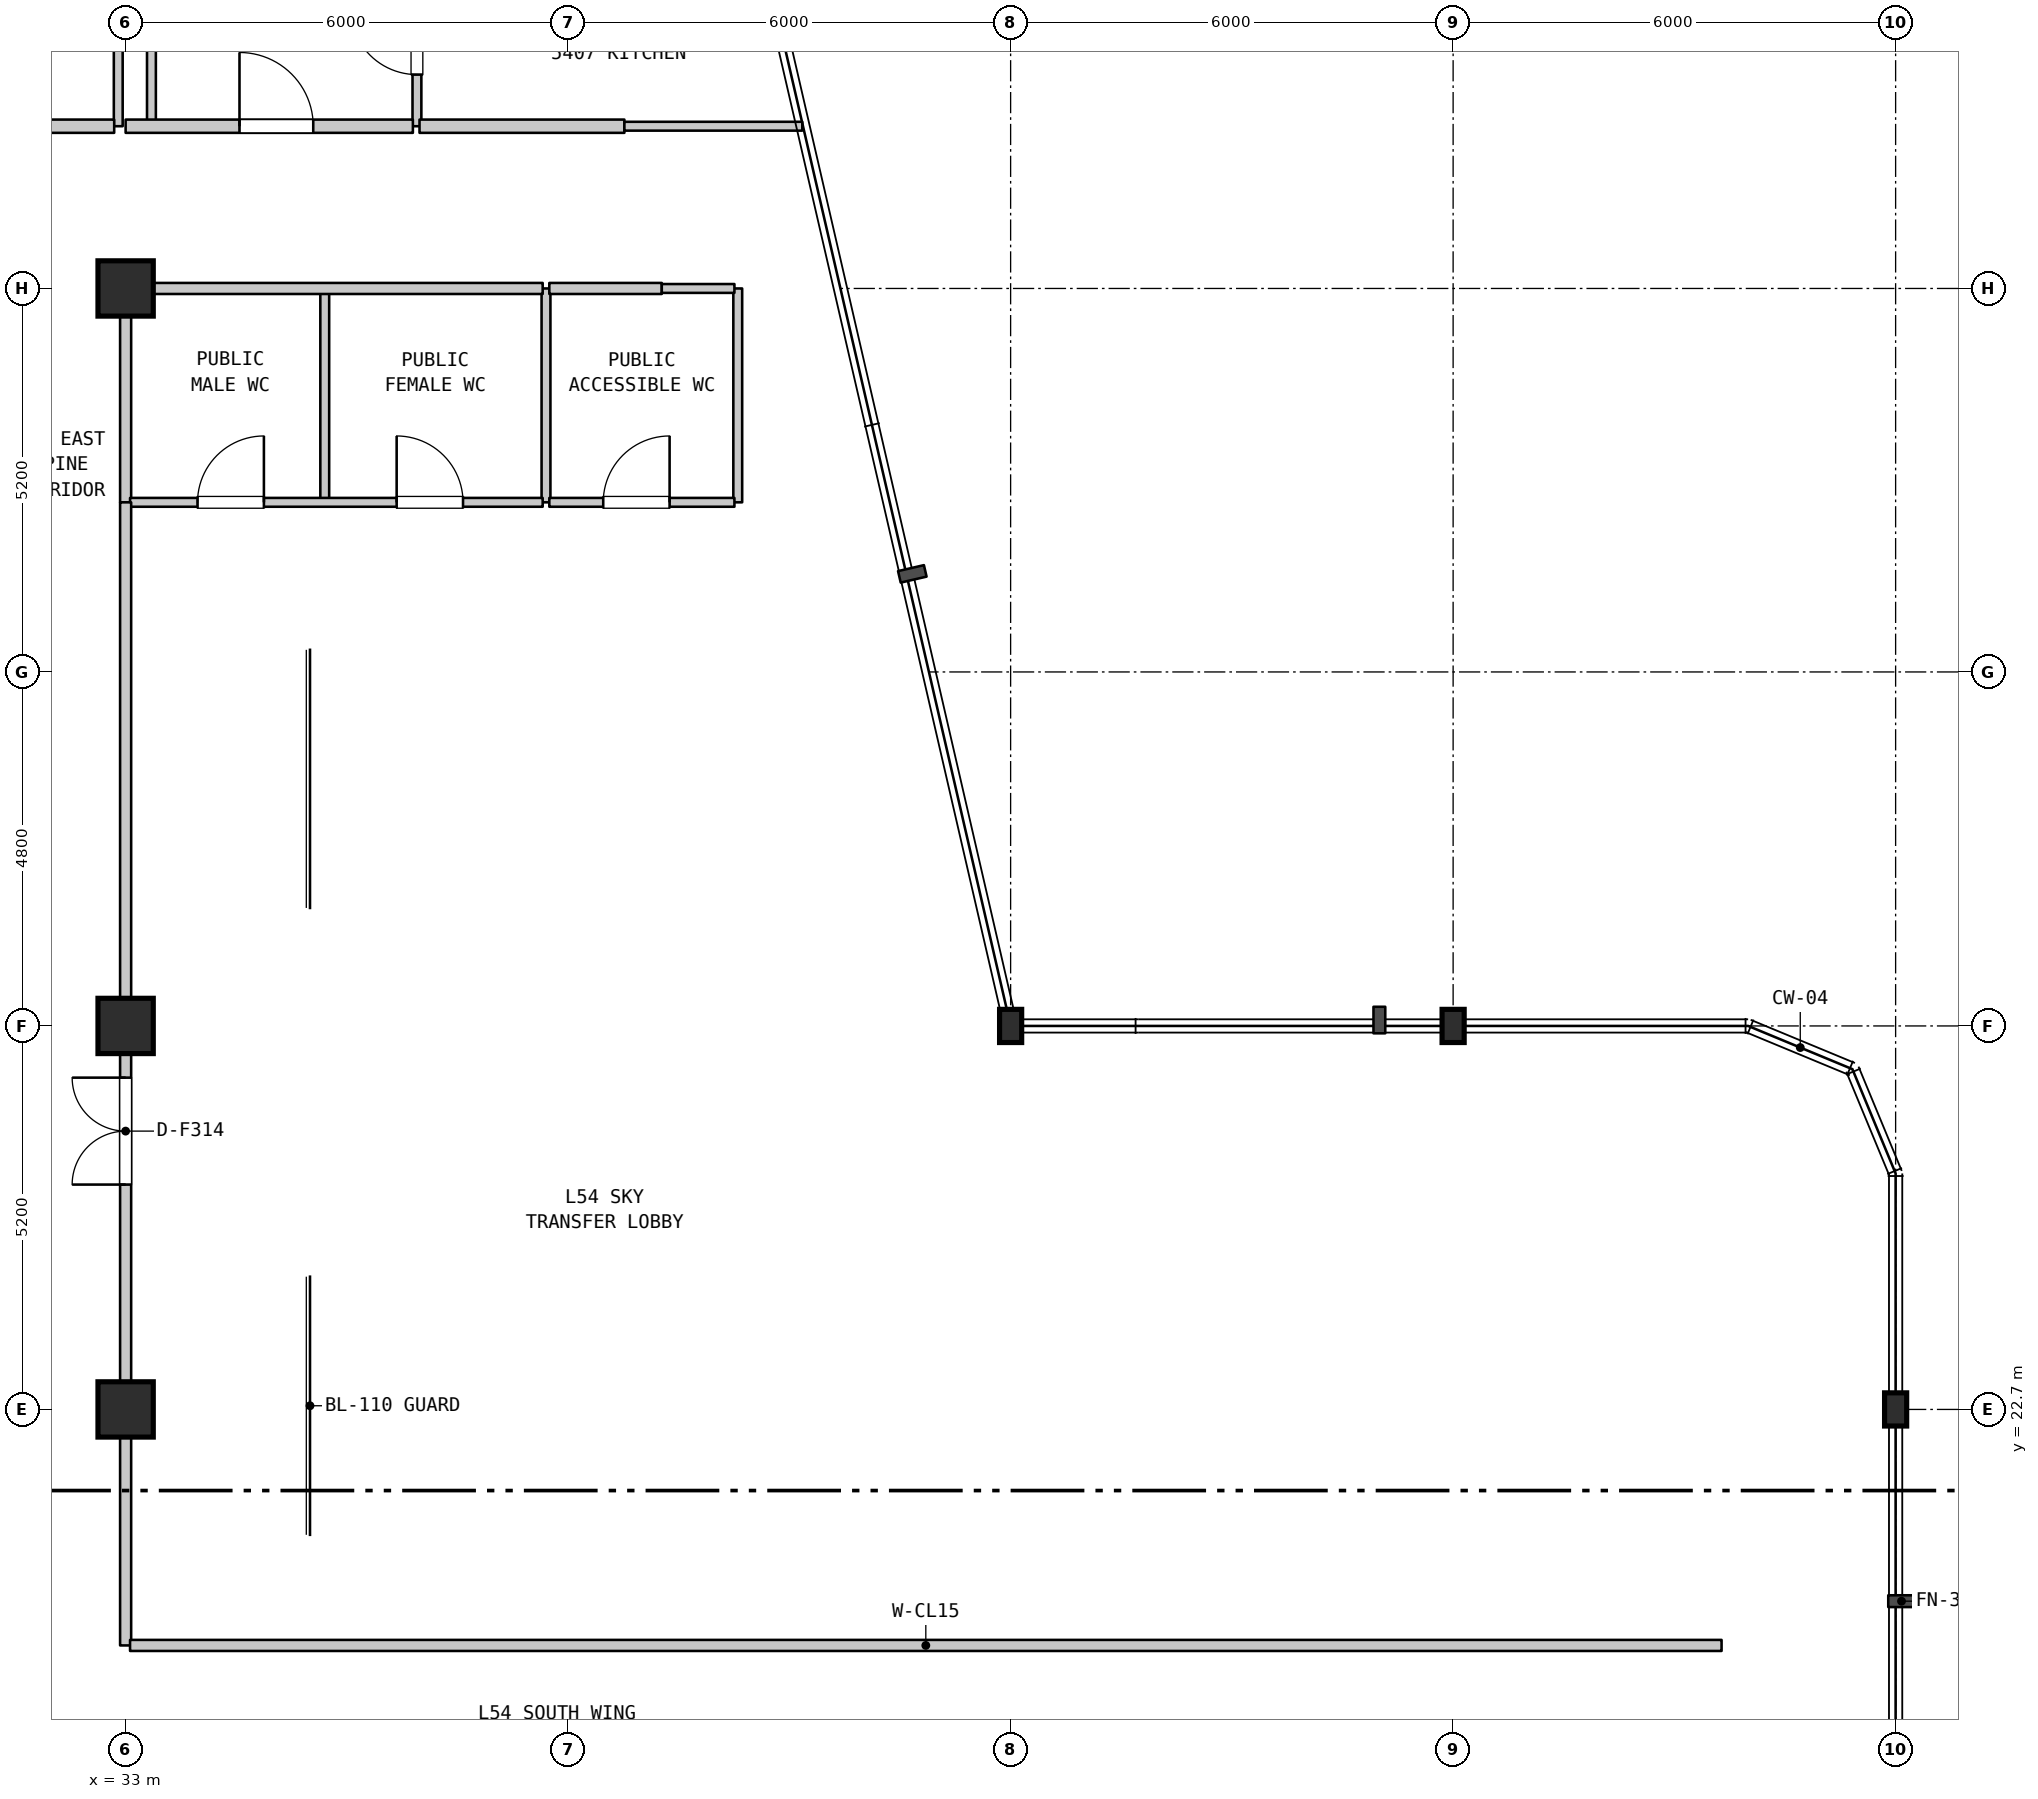
"""IFC4 building model, lengths in metres.
Left out: names, types, materials, properties, quantities, classifications, styles, units other than length and angle.
Written with IfcOpenShell. Run it as: python <this file> out.ifc"""

import sys

from ifc_helpers import new_model, si_unit, direction, frame, frame_2d, origin, origin_2d, place, context, subcontext, project, spatial, rectangle, i_section, extrude, element, fill, save


model = new_model("IFC4")
c1 = context("Model", 3, precision=1e-05, world=origin(), true_north=direction((0.0, 1.0)))
c2 = subcontext(c1, "Body", "Model", "MODEL_VIEW")
j1 = project(units=[si_unit("LENGTHUNIT", "METRE"), si_unit("PLANEANGLEUNIT", "RADIAN")], contexts=[c1])
p1 = place(None, origin())
s1 = spatial("IfcSite", under=j1, at=p1, CompositionType="ELEMENT")
p2 = place(p1, origin())
s2 = spatial("IfcBuilding", under=s1, at=p2, CompositionType="ELEMENT")
p3 = place(p2, frame((0.0, 0.0, 218.0)))
s3 = spatial("IfcBuildingStorey", under=s2, at=p3, CompositionType="ELEMENT", Elevation=218.0)
for number, where, z_axis, x_axis in (
    (1, (33.0, 22.7, 0.0), (0.0, 0.0, 1.0), (1.0, 0.0, 0.0)),
    (2, (33.0, 27.9, 0.0), (0.0, 0.0, 1.0), (1.0, 0.0, 0.0)),
    (3, (33.0, 37.9, 0.0), (0.0, 0.0, 1.0), (1.0, 0.0, 0.0)),
):
    element("IfcColumn", number, at=place(p3, frame(where, z_axis=z_axis, x_axis=x_axis)), inside=s3, PredefinedType="COLUMN", context=c2, shape_type="SweptSolid", body=[
        extrude(rectangle(XDim=0.75, YDim=0.75, at=origin_2d()), origin(), (0.0, 0.0, 1.0), 4.8),
    ])
for number, where, z_axis, x_axis in (
    (4, (45.0, 27.9, 0.0), (0.0, 0.0, 1.0), (1.0, 0.0, 0.0)),
    (5, (51.0, 27.9, 0.0), (0.0, 0.0, 1.0), (1.0, 0.0, 0.0)),
    (6, (57.0, 22.7, 0.0), (0.0, 0.0, 1.0), (1.0, 0.0, 0.0)),
):
    element("IfcColumn", number, at=place(p3, frame(where, z_axis=z_axis, x_axis=x_axis)), inside=s3, PredefinedType="COLUMN", context=c2, shape_type="SweptSolid", body=[
        extrude(i_section(OverallWidth=0.3, OverallDepth=0.45, WebThickness=0.014, FlangeThickness=0.026, FilletRadius=0.027, at=origin_2d()), origin(), (0.0, 0.0, 1.0), 4.8),
    ])
p4 = place(p3, frame((32.9, 40.1, 0.0), z_axis=(0.0, 0.0, 1.0), x_axis=(0.0, 1.0, 0.0)))
e7 = element("IfcWall", 7, at=p4, inside=s3, PredefinedType="PARTITIONING", context=c2, shape_type="SweptSolid", body=[
    extrude(rectangle(XDim=2.3, YDim=0.12, at=frame_2d((1.15, 0.0))), origin(), (0.0, 0.0, 1.0), 3.89),
])
p5 = place(p3, frame((33.0, 19.5, 0.0), z_axis=(0.0, 0.0, 1.0), x_axis=(0.0, 1.0, 0.0)))
e8 = element("IfcWall", 8, at=p5, inside=s3, PredefinedType="STANDARD", context=c2, shape_type="SweptSolid", body=[
    extrude(rectangle(XDim=8.4, YDim=0.15, at=frame_2d((4.2, 0.0))), origin(), (0.0, 0.0, 1.0), 4.09),
])
p6 = place(p5, frame((6.249, 0.0, 0.0)))
e9 = element("IfcOpeningElement", 9, at=p6, cuts=e8, PredefinedType="OPENING", context=c2, shape_type="SweptSolid", body=[
    extrude(rectangle(XDim=1.45, YDim=2.2, at=frame_2d((0.725, 1.1))), frame((0.0, 0.085, 0.0), z_axis=(0.0, -1.0, 0.0), x_axis=(1.0, 0.0, 0.0)), (0.0, 0.0, 1.0), 0.17),
])
p7 = place(p3, frame((33.0, 35.0, 0.0), z_axis=(0.0, 0.0, 1.0), x_axis=(0.0, 1.0, 0.0)))
e10 = element("IfcWall", 10, at=p7, inside=s3, PredefinedType="STANDARD", context=c2, shape_type="SweptSolid", body=[
    extrude(rectangle(XDim=2.9, YDim=0.15, at=frame_2d((1.45, 0.0))), origin(), (0.0, 0.0, 1.0), 3.99),
])
p8 = place(p3, frame((33.35, 40.1, 0.0), z_axis=(0.0, 0.0, 1.0), x_axis=(0.0, 1.0, 0.0)))
e11 = element("IfcWall", 11, at=p8, inside=s3, PredefinedType="PARTITIONING", context=c2, shape_type="SweptSolid", body=[
    extrude(rectangle(XDim=13.79, YDim=0.12, at=frame_2d((6.895, 0.0))), origin(), (0.0, 0.0, 1.0), 4.49),
])
p9 = place(p3, frame((35.7, 35.0, 0.0), z_axis=(0.0, 0.0, 1.0), x_axis=(0.0, 1.0, 0.0)))
e12 = element("IfcWall", 12, at=p9, inside=s3, PredefinedType="PARTITIONING", context=c2, shape_type="SweptSolid", body=[
    extrude(rectangle(XDim=2.9, YDim=0.12, at=frame_2d((1.45, 0.0))), origin(), (0.0, 0.0, 1.0), 4.49),
])
p10 = place(p3, frame((36.95, 40.1, 0.0), z_axis=(0.0, 0.0, 1.0), x_axis=(0.0, 1.0, 0.0)))
e13 = element("IfcWall", 13, at=p10, inside=s3, PredefinedType="PARTITIONING", context=c2, shape_type="SweptSolid", body=[
    extrude(rectangle(XDim=2.3, YDim=0.12, at=frame_2d((1.15, 0.0))), origin(), (0.0, 0.0, 1.0), 4.49),
])
p11 = place(p10, frame((0.7, 0.0, 0.0)))
e14 = element("IfcOpeningElement", 14, at=p11, cuts=e13, PredefinedType="OPENING", context=c2, shape_type="SweptSolid", body=[
    extrude(rectangle(XDim=0.9, YDim=2.15, at=frame_2d((0.45, 1.075))), frame((0.0, 0.07, 0.0), z_axis=(0.0, -1.0, 0.0), x_axis=(1.0, 0.0, 0.0)), (0.0, 0.0, 1.0), 0.14),
])
for number, where, z_axis, x_axis in (
    (15, (38.7, 35.0, 0.0), (0.0, 0.0, 1.0), (0.0, 1.0, 0.0)),
    (16, (41.3, 35.0, 0.0), (0.0, 0.0, 1.0), (0.0, 1.0, 0.0)),
):
    element("IfcWall", number, at=place(p3, frame(where, z_axis=z_axis, x_axis=x_axis)), inside=s3, PredefinedType="PARTITIONING", context=c2, shape_type="SweptSolid", body=[
        extrude(rectangle(XDim=2.9, YDim=0.12, at=frame_2d((1.45, 0.0))), origin(), (0.0, 0.0, 1.0), 4.49),
    ])
p12 = place(p3, frame((33.06, 19.5, 0.0), z_axis=(0.0, 0.0, 1.0), x_axis=(1.0, 0.0, 0.0)))
e17 = element("IfcWall", 17, at=p12, inside=s3, PredefinedType="STANDARD", context=c2, shape_type="SweptSolid", body=[
    extrude(rectangle(XDim=21.58, YDim=0.15, at=frame_2d((10.79, 0.0))), origin(), (0.0, 0.0, 1.0), 4.49),
])
p13 = place(p3, frame((33.06, 35.0, 0.0), z_axis=(0.0, 0.0, 1.0), x_axis=(1.0, 0.0, 0.0)))
e18 = element("IfcWall", 18, at=p13, inside=s3, PredefinedType="PARTITIONING", context=c2, shape_type="SweptSolid", body=[
    extrude(rectangle(XDim=5.595, YDim=0.12, at=frame_2d((2.797, 0.0))), origin(), (0.0, 0.0, 1.0), 4.49),
])
p14 = place(p13, frame((0.915, 0.0, 0.0)))
e19 = element("IfcOpeningElement", 19, at=p14, cuts=e18, PredefinedType="OPENING", context=c2, shape_type="SweptSolid", body=[
    extrude(rectangle(XDim=0.9, YDim=2.1, at=frame_2d((0.45, 1.05))), frame((0.0, 0.07, 0.0), z_axis=(0.0, -1.0, 0.0), x_axis=(1.0, 0.0, 0.0)), (0.0, 0.0, 1.0), 0.14),
])
p15 = place(p13, frame((3.615, 0.0, 0.0)))
e20 = element("IfcOpeningElement", 20, at=p15, cuts=e18, PredefinedType="OPENING", context=c2, shape_type="SweptSolid", body=[
    extrude(rectangle(XDim=0.9, YDim=2.1, at=frame_2d((0.45, 1.05))), frame((0.0, 0.07, 0.0), z_axis=(0.0, -1.0, 0.0), x_axis=(1.0, 0.0, 0.0)), (0.0, 0.0, 1.0), 0.14),
])
p16 = place(p3, frame((38.745, 35.0, 0.0), z_axis=(0.0, 0.0, 1.0), x_axis=(1.0, 0.0, 0.0)))
e21 = element("IfcWall", 21, at=p16, inside=s3, PredefinedType="PARTITIONING", context=c2, shape_type="SweptSolid", body=[
    extrude(rectangle(XDim=2.51, YDim=0.12, at=frame_2d((1.255, 0.0))), origin(), (0.0, 0.0, 1.0), 4.49),
])
p17 = place(p16, frame((0.731, 0.0, 0.0)))
e22 = element("IfcOpeningElement", 22, at=p17, cuts=e21, PredefinedType="OPENING", context=c2, shape_type="SweptSolid", body=[
    extrude(rectangle(XDim=0.9, YDim=2.1, at=frame_2d((0.45, 1.05))), frame((0.0, 0.07, 0.0), z_axis=(0.0, -1.0, 0.0), x_axis=(1.0, 0.0, 0.0)), (0.0, 0.0, 1.0), 0.14),
])
p18 = place(p3, frame((33.06, 37.9, 0.0), z_axis=(0.0, 0.0, 1.0), x_axis=(1.0, 0.0, 0.0)))
e23 = element("IfcWall", 23, at=p18, inside=s3, PredefinedType="STANDARD", context=c2, shape_type="SweptSolid", body=[
    extrude(rectangle(XDim=5.595, YDim=0.15, at=frame_2d((2.797, 0.0))), origin(), (0.0, 0.0, 1.0), 4.49),
])
p19 = place(p3, frame((38.745, 37.9, 0.0), z_axis=(0.0, 0.0, 1.0), x_axis=(1.0, 0.0, 0.0)))
e24 = element("IfcWall", 24, at=p19, inside=s3, PredefinedType="STANDARD", context=c2, shape_type="SweptSolid", body=[
    extrude(rectangle(XDim=1.525, YDim=0.15, at=frame_2d((0.762, 0.0))), origin(), (0.0, 0.0, 1.0), 4.49),
])
p20 = place(p3, frame((40.27, 37.9, 0.0), z_axis=(0.0, 0.0, 1.0), x_axis=(1.0, 0.0, 0.0)))
e25 = element("IfcWall", 25, at=p20, inside=s3, PredefinedType="PARTITIONING", context=c2, shape_type="SweptSolid", body=[
    extrude(rectangle(XDim=0.985, YDim=0.12, at=frame_2d((0.492, 0.0))), origin(), (0.0, 0.0, 1.0), 4.49),
])
p21 = place(p3, frame((29.695, 40.1, 0.0), z_axis=(0.0, 0.0, 1.0), x_axis=(1.0, 0.0, 0.0)))
e26 = element("IfcWall", 26, at=p21, inside=s3, PredefinedType="STANDARD", context=c2, shape_type="SweptSolid", body=[
    extrude(rectangle(XDim=3.15, YDim=0.18, at=frame_2d((1.575, 0.0))), origin(), (0.0, 0.0, 1.0), 4.49),
])
p22 = place(p3, frame((33.0, 40.1, 0.0), z_axis=(0.0, 0.0, 1.0), x_axis=(1.0, 0.0, 0.0)))
e27 = element("IfcWall", 27, at=p22, inside=s3, PredefinedType="STANDARD", context=c2, shape_type="SweptSolid", body=[
    extrude(rectangle(XDim=3.895, YDim=0.18, at=frame_2d((1.948, 0.0))), origin(), (0.0, 0.0, 1.0), 4.49),
])
p23 = place(p22, frame((1.544, 0.0, 0.0)))
e28 = element("IfcOpeningElement", 28, at=p23, cuts=e27, PredefinedType="OPENING", context=c2, shape_type="SweptSolid", body=[
    extrude(rectangle(XDim=1.0, YDim=2.15, at=frame_2d((0.5, 1.075))), frame((0.0, 0.1, 0.0), z_axis=(0.0, -1.0, 0.0), x_axis=(1.0, 0.0, 0.0)), (0.0, 0.0, 1.0), 0.2),
])
p24 = place(p3, frame((36.985, 40.1, 0.0), z_axis=(0.0, 0.0, 1.0), x_axis=(1.0, 0.0, 0.0)))
e29 = element("IfcWall", 29, at=p24, inside=s3, PredefinedType="STANDARD", context=c2, shape_type="SweptSolid", body=[
    extrude(rectangle(XDim=2.778, YDim=0.18, at=frame_2d((1.389, 0.0))), origin(), (0.0, 0.0, 1.0), 4.49),
])
p25 = place(p3, frame((39.763, 40.1, 0.0), z_axis=(0.0, 0.0, 1.0), x_axis=(1.0, 0.0, 0.0)))
e30 = element("IfcWall", 30, at=p25, inside=s3, PredefinedType="PARTITIONING", context=c2, shape_type="SweptSolid", body=[
    extrude(rectangle(XDim=2.412, YDim=0.12, at=frame_2d((1.206, 0.0))), origin(), (0.0, 0.0, 1.0), 4.49),
])
p26 = place(p3, frame((33.0, 27.9, 0.0), z_axis=(0.0, 0.0, 1.0), x_axis=(0.0, 1.0, 0.0)))
e31 = element("IfcWall", 31, at=p26, inside=s3, PredefinedType="STANDARD", context=c2, shape_type="SweptSolid", body=[
    extrude(rectangle(XDim=7.1, YDim=0.15, at=frame_2d((3.55, 0.0))), origin(), (0.0, 0.0, 1.0), 3.99),
])
p27 = place(p6, origin())
e32 = element("IfcDoor", 32, at=p27, inside=s3, OperationType="DOUBLE_DOOR_SINGLE_SWING", PredefinedType="DOOR", context=c2, shape_type="SweptSolid", body=[
    extrude(rectangle(XDim=1.45, YDim=2.2, at=frame_2d((0.725, 1.1))), frame((0.0, 0.025, 0.0), z_axis=(0.0, -1.0, 0.0), x_axis=(1.0, 0.0, 0.0)), (0.0, 0.0, 1.0), 0.05),
])
fill(e9, e32)
p28 = place(p11, origin())
e33 = element("IfcDoor", 33, at=p28, inside=s3, OperationType="SINGLE_SWING_RIGHT", PredefinedType="DOOR", context=c2, shape_type="SweptSolid", body=[
    extrude(rectangle(XDim=0.9, YDim=2.15, at=frame_2d((0.45, 1.075))), frame((0.0, 0.025, 0.0), z_axis=(0.0, -1.0, 0.0), x_axis=(1.0, 0.0, 0.0)), (0.0, 0.0, 1.0), 0.05),
])
fill(e14, e33)
p29 = place(p14, origin())
e34 = element("IfcDoor", 34, at=p29, inside=s3, OperationType="SINGLE_SWING_RIGHT", PredefinedType="DOOR", context=c2, shape_type="SweptSolid", body=[
    extrude(rectangle(XDim=0.9, YDim=2.1, at=frame_2d((0.45, 1.05))), frame((0.0, 0.025, 0.0), z_axis=(0.0, -1.0, 0.0), x_axis=(1.0, 0.0, 0.0)), (0.0, 0.0, 1.0), 0.05),
])
fill(e19, e34)
p30 = place(p15, origin())
e35 = element("IfcDoor", 35, at=p30, inside=s3, OperationType="SINGLE_SWING_LEFT", PredefinedType="DOOR", context=c2, shape_type="SweptSolid", body=[
    extrude(rectangle(XDim=0.9, YDim=2.1, at=frame_2d((0.45, 1.05))), frame((0.0, 0.025, 0.0), z_axis=(0.0, -1.0, 0.0), x_axis=(1.0, 0.0, 0.0)), (0.0, 0.0, 1.0), 0.05),
])
fill(e20, e35)
p31 = place(p17, origin())
e36 = element("IfcDoor", 36, at=p31, inside=s3, OperationType="SINGLE_SWING_RIGHT", PredefinedType="DOOR", context=c2, shape_type="SweptSolid", body=[
    extrude(rectangle(XDim=0.9, YDim=2.1, at=frame_2d((0.45, 1.05))), frame((0.0, 0.025, 0.0), z_axis=(0.0, -1.0, 0.0), x_axis=(1.0, 0.0, 0.0)), (0.0, 0.0, 1.0), 0.05),
])
fill(e22, e36)
p32 = place(p23, origin())
e37 = element("IfcDoor", 37, at=p32, inside=s3, OperationType="SINGLE_SWING_LEFT", PredefinedType="DOOR", context=c2, shape_type="SweptSolid", body=[
    extrude(rectangle(XDim=1.0, YDim=2.15, at=frame_2d((0.5, 1.075))), frame((0.0, 0.025, 0.0), z_axis=(0.0, -1.0, 0.0), x_axis=(1.0, 0.0, 0.0)), (0.0, 0.0, 1.0), 0.05),
])
fill(e28, e37)
save(model, sys.argv[1])
